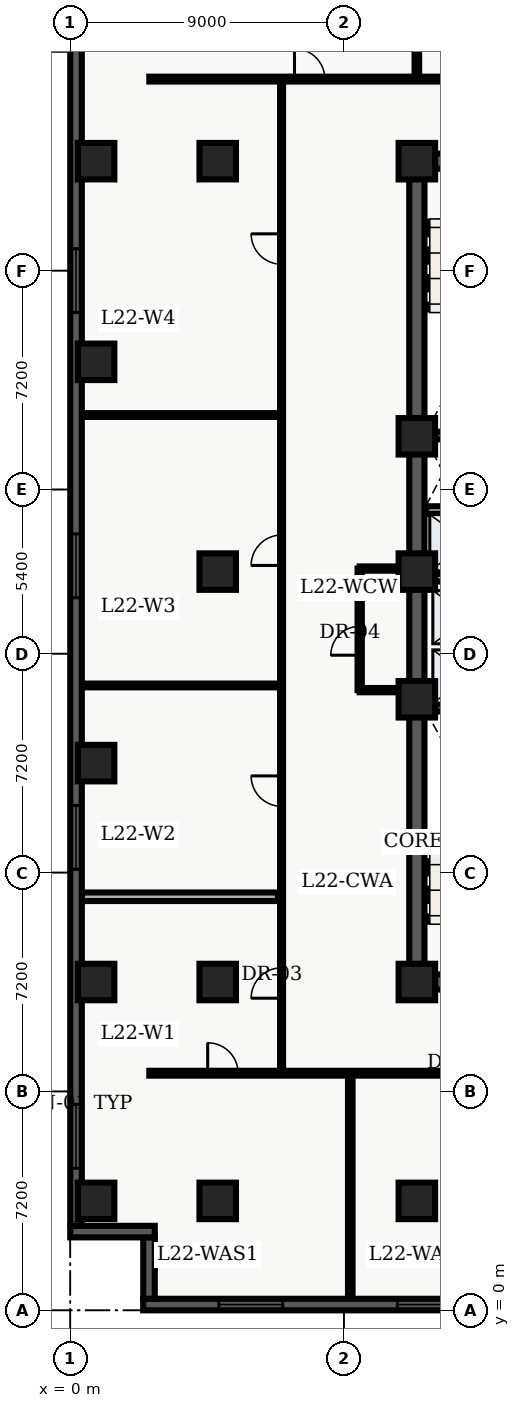
"""IFC4 building model, lengths in metres.
Left out: names, types, materials, properties, quantities, classifications, styles, units other than length and angle.
Written with IfcOpenShell. Run it as: python <this file> out.ifc"""

import sys

from ifc_helpers import new_model, entity, si_unit, converted_unit, direction, frame, origin_with_axes, origin_2d_with_axis, place, context, subcontext, project, spatial, polyline, rectangle, outline, extrude, element, fill, save


model = new_model("IFC4")
c1 = context("Model", 3, precision=1e-05, world=origin_with_axes(), true_north=direction((0.0, 1.0)))
c2 = subcontext(c1, "Body", "Model", "MODEL_VIEW")
j1 = project(units=[si_unit("LENGTHUNIT", "METRE"), converted_unit("PLANEANGLEUNIT", "DEGREE", entity("IfcPlaneAngleMeasure", 0.017), si_unit("PLANEANGLEUNIT", "RADIAN"), dimensions=[0, 0, 0, 0, 0, 0, 0])], contexts=[c1])
p1 = place(None, origin_with_axes())
s1 = spatial("IfcSite", under=j1, at=p1, CompositionType="ELEMENT")
p2 = place(p1, origin_with_axes())
s2 = spatial("IfcBuilding", under=s1, at=p2, CompositionType="ELEMENT")
p3 = place(p2, frame((0.0, 0.0, 93.0), z_axis=(0.0, 0.0, 1.0), x_axis=(1.0, 0.0, 0.0)))
s3 = spatial("IfcBuildingStorey", under=s2, at=p3, CompositionType="ELEMENT", Elevation=93.0)
p4 = place(p3, frame((11.4, 10.8, 0.0), z_axis=(0.0, 0.0, 1.0), x_axis=(0.0, 1.0, 0.0)))
e1 = element("IfcWall", 1, at=p4, inside=s3, PredefinedType="SHEAR", context=c2, shape_type="SweptSolid", body=[
    extrude(outline(polyline([(0.0, -0.25), (27.0, -0.25), (27.0, 0.25), (0.0, 0.25), (0.0, -0.25)])), origin_with_axes(), (0.0, 0.0, 1.0), 3.66),
])
p5 = place(p3, frame((11.4, 10.8, 0.0), z_axis=(0.0, 0.0, 1.0), x_axis=(1.0, 0.0, 0.0)))
e2 = element("IfcWall", 2, at=p5, inside=s3, PredefinedType="SHEAR", context=c2, shape_type="SweptSolid", body=[
    extrude(outline(polyline([(0.0, -0.25), (7.2, -0.25), (7.2, 0.25), (0.0, 0.25), (0.0, -0.25)])), origin_with_axes(), (0.0, 0.0, 1.0), 3.66),
])
p6 = place(p5, frame((2.625, 0.0, 0.0), z_axis=(0.0, 0.0, 1.0), x_axis=(1.0, 0.0, 0.0)))
e3 = element("IfcOpeningElement", 3, at=p6, cuts=e2, PredefinedType="OPENING", context=c2, shape_type="SweptSolid", body=[
    extrude(rectangle(XDim=1.05, YDim=0.52, at=origin_2d_with_axis()), origin_with_axes(), (0.0, 0.0, 1.0), 2.15),
])
p7 = place(p3, frame((11.4, 37.8, 0.0), z_axis=(0.0, 0.0, 1.0), x_axis=(1.0, 0.0, 0.0)))
e4 = element("IfcWall", 4, at=p7, inside=s3, PredefinedType="SHEAR", context=c2, shape_type="SweptSolid", body=[
    extrude(outline(polyline([(0.0, -0.25), (7.2, -0.25), (7.2, 0.25), (0.0, 0.25), (0.0, -0.25)])), origin_with_axes(), (0.0, 0.0, 1.0), 3.66),
])
p8 = place(p7, frame((2.625, 0.0, 0.0), z_axis=(0.0, 0.0, 1.0), x_axis=(1.0, 0.0, 0.0)))
e5 = element("IfcOpeningElement", 5, at=p8, cuts=e4, PredefinedType="OPENING", context=c2, shape_type="SweptSolid", body=[
    extrude(rectangle(XDim=1.05, YDim=0.52, at=origin_2d_with_axis()), origin_with_axes(), (0.0, 0.0, 1.0), 2.15),
])
for number, where, z_axis, x_axis in (
    (6, (11.65, 19.825, 0.0), (0.0, 0.0, 1.0), (1.0, 0.0, 0.0)),
    (7, (11.65, 28.775, 0.0), (0.0, 0.0, 1.0), (1.0, 0.0, 0.0)),
):
    element("IfcWall", number, at=place(p3, frame(where, z_axis=z_axis, x_axis=x_axis)), inside=s3, PredefinedType="SHEAR", context=c2, shape_type="SweptSolid", body=[
        extrude(outline(polyline([(0.0, -0.125), (6.7, -0.125), (6.7, 0.125), (0.0, 0.125), (0.0, -0.125)])), origin_with_axes(), (0.0, 0.0, 1.0), 3.66),
    ])
p9 = place(p3, frame((11.7, 24.1, 0.0), z_axis=(0.0, 0.0, 1.0), x_axis=(1.0, 0.0, 0.0)))
e8 = element("IfcWall", 8, at=p9, inside=s3, PredefinedType="SOLIDWALL", context=c2, shape_type="SweptSolid", body=[
    extrude(outline(polyline([(0.0, -0.125), (6.6, -0.125), (6.6, 0.125), (0.0, 0.125), (0.0, -0.125)])), origin_with_axes(), (0.0, 0.0, 1.0), 2.7),
])
p10 = place(p9, frame((3.75, 0.0, 0.0), z_axis=(0.0, 0.0, 1.0), x_axis=(1.0, 0.0, 0.0)))
e9 = element("IfcOpeningElement", 9, at=p10, cuts=e8, PredefinedType="OPENING", context=c2, shape_type="SweptSolid", body=[
    extrude(rectangle(XDim=0.9, YDim=0.27, at=origin_2d_with_axis()), origin_with_axes(), (0.0, 0.0, 1.0), 2.15),
])
p11 = place(p3, frame((11.7, 26.325, 0.0), z_axis=(0.0, 0.0, 1.0), x_axis=(1.0, 0.0, 0.0)))
e10 = element("IfcWall", 10, at=p11, inside=s3, PredefinedType="SOLIDWALL", context=c2, shape_type="SweptSolid", body=[
    extrude(outline(polyline([(0.0, -0.125), (6.6, -0.125), (6.6, 0.125), (0.0, 0.125), (0.0, -0.125)])), origin_with_axes(), (0.0, 0.0, 1.0), 2.7),
])
p12 = place(p11, frame((3.5, 0.0, 0.0), z_axis=(0.0, 0.0, 1.0), x_axis=(1.0, 0.0, 0.0)))
e11 = element("IfcOpeningElement", 11, at=p12, cuts=e10, PredefinedType="OPENING", context=c2, shape_type="SweptSolid", body=[
    extrude(rectangle(XDim=0.9, YDim=0.27, at=origin_2d_with_axis()), origin_with_axes(), (0.0, 0.0, 1.0), 2.15),
])
for number, where, z_axis, x_axis in (
    (12, (11.4, 3.6, 0.0), (0.0, 0.0, 1.0), (1.0, 0.0, 0.0)),
    (13, (11.4, 10.8, 0.0), (0.0, 0.0, 1.0), (1.0, 0.0, 0.0)),
    (14, (11.4, 20.1, 0.0), (0.0, 0.0, 1.0), (1.0, 0.0, 0.0)),
    (15, (11.4, 24.3, 0.0), (0.0, 0.0, 1.0), (1.0, 0.0, 0.0)),
    (16, (11.4, 28.75, 0.0), (0.0, 0.0, 1.0), (1.0, 0.0, 0.0)),
    (17, (11.4, 37.8, 0.0), (0.0, 0.0, 1.0), (1.0, 0.0, 0.0)),
    (18, (4.85, 3.6, 0.0), (0.0, 0.0, 1.0), (1.0, 0.0, 0.0)),
    (19, (4.85, 10.8, 0.0), (0.0, 0.0, 1.0), (1.0, 0.0, 0.0)),
    (20, (4.85, 24.3, 0.0), (0.0, 0.0, 1.0), (1.0, 0.0, 0.0)),
    (21, (4.85, 37.8, 0.0), (0.0, 0.0, 1.0), (1.0, 0.0, 0.0)),
    (22, (0.85, 3.6, 0.0), (0.0, 0.0, 1.0), (1.0, 0.0, 0.0)),
    (23, (0.85, 10.8, 0.0), (0.0, 0.0, 1.0), (1.0, 0.0, 0.0)),
    (24, (0.85, 18.0, 0.0), (0.0, 0.0, 1.0), (1.0, 0.0, 0.0)),
    (25, (0.85, 31.2, 0.0), (0.0, 0.0, 1.0), (1.0, 0.0, 0.0)),
    (26, (0.85, 37.8, 0.0), (0.0, 0.0, 1.0), (1.0, 0.0, 0.0)),
):
    element("IfcColumn", number, at=place(p3, frame(where, z_axis=z_axis, x_axis=x_axis)), inside=s3, PredefinedType="COLUMN", context=c2, shape_type="SweptSolid", body=[
        extrude(rectangle(XDim=1.2, YDim=1.2, at=origin_2d_with_axis()), origin_with_axes(), (0.0, 0.0, 1.0), 3.9),
    ])
p13 = place(p3, frame((9.52, 20.4, 0.0), z_axis=(0.0, 0.0, 1.0), x_axis=(0.0, 1.0, 0.0)))
e27 = element("IfcWall", 27, at=p13, inside=s3, PredefinedType="PARTITIONING", context=c2, shape_type="SweptSolid", body=[
    extrude(outline(polyline([(0.0, -0.07), (4.0, -0.07), (4.0, 0.07), (0.0, 0.07), (0.0, -0.07)])), origin_with_axes(), (0.0, 0.0, 1.0), 2.7),
])
p14 = place(p13, frame((1.625, 0.0, 0.0), z_axis=(0.0, 0.0, 1.0), x_axis=(1.0, 0.0, 0.0)))
e28 = element("IfcOpeningElement", 28, at=p14, cuts=e27, PredefinedType="OPENING", context=c2, shape_type="SweptSolid", body=[
    extrude(rectangle(XDim=0.95, YDim=0.16, at=origin_2d_with_axis()), origin_with_axes(), (0.0, 0.0, 1.0), 2.15),
])
for number, where, z_axis, x_axis in (
    (29, (9.52, 20.4, 0.0), (0.0, 0.0, 1.0), (1.0, 0.0, 0.0)),
    (30, (9.52, 24.4, 0.0), (0.0, 0.0, 1.0), (1.0, 0.0, 0.0)),
):
    element("IfcWall", number, at=place(p3, frame(where, z_axis=z_axis, x_axis=x_axis)), inside=s3, PredefinedType="PARTITIONING", context=c2, shape_type="SweptSolid", body=[
        extrude(outline(polyline([(0.0, -0.07), (1.58, -0.07), (1.58, 0.07), (0.0, 0.07), (0.0, -0.07)])), origin_with_axes(), (0.0, 0.0, 1.0), 2.7),
    ])
p15 = place(p3, frame((2.6, 7.8, 0.0), z_axis=(0.0, 0.0, 1.0), x_axis=(1.0, 0.0, 0.0)))
e31 = element("IfcWall", 31, at=p15, inside=s3, PredefinedType="PARTITIONING", context=c2, shape_type="SweptSolid", body=[
    extrude(outline(polyline([(0.0, -0.08), (18.625, -0.08), (18.625, 0.08), (0.0, 0.08), (0.0, -0.08)])), origin_with_axes(), (0.0, 0.0, 1.0), 2.7),
])
p16 = place(p15, frame((2.42, 0.0, 0.0), z_axis=(0.0, 0.0, 1.0), x_axis=(1.0, 0.0, 0.0)))
e32 = element("IfcOpeningElement", 32, at=p16, cuts=e31, PredefinedType="OPENING", context=c2, shape_type="SweptSolid", body=[
    extrude(rectangle(XDim=1.0, YDim=0.18, at=origin_2d_with_axis()), origin_with_axes(), (0.0, 0.0, 1.0), 2.15),
])
p17 = place(p15, frame((10.523, 0.0, 0.0), z_axis=(0.0, 0.0, 1.0), x_axis=(1.0, 0.0, 0.0)))
e33 = element("IfcOpeningElement", 33, at=p17, cuts=e31, PredefinedType="OPENING", context=c2, shape_type="SweptSolid", body=[
    extrude(rectangle(XDim=1.2, YDim=0.18, at=origin_2d_with_axis()), origin_with_axes(), (0.0, 0.0, 1.0), 2.2),
])
p18 = place(p15, frame((16.468, 0.0, 0.0), z_axis=(0.0, 0.0, 1.0), x_axis=(1.0, 0.0, 0.0)))
e34 = element("IfcOpeningElement", 34, at=p18, cuts=e31, PredefinedType="OPENING", context=c2, shape_type="SweptSolid", body=[
    extrude(rectangle(XDim=1.0, YDim=0.18, at=origin_2d_with_axis()), origin_with_axes(), (0.0, 0.0, 1.0), 2.15),
])
p19 = place(p3, frame((2.6, 40.5, 0.0), z_axis=(0.0, 0.0, 1.0), x_axis=(1.0, 0.0, 0.0)))
e35 = element("IfcWall", 35, at=p19, inside=s3, PredefinedType="PARTITIONING", context=c2, shape_type="SweptSolid", body=[
    extrude(outline(polyline([(0.0, -0.08), (18.65, -0.08), (18.65, 0.08), (0.0, 0.08), (0.0, -0.08)])), origin_with_axes(), (0.0, 0.0, 1.0), 2.7),
])
p20 = place(p19, frame((5.275, 0.0, 0.0), z_axis=(0.0, 0.0, 1.0), x_axis=(1.0, 0.0, 0.0)))
e36 = element("IfcOpeningElement", 36, at=p20, cuts=e35, PredefinedType="OPENING", context=c2, shape_type="SweptSolid", body=[
    extrude(rectangle(XDim=1.0, YDim=0.18, at=origin_2d_with_axis()), origin_with_axes(), (0.0, 0.0, 1.0), 2.15),
])
p21 = place(p19, frame((12.61, 0.0, 0.0), z_axis=(0.0, 0.0, 1.0), x_axis=(1.0, 0.0, 0.0)))
e37 = element("IfcOpeningElement", 37, at=p21, cuts=e35, PredefinedType="OPENING", context=c2, shape_type="SweptSolid", body=[
    extrude(rectangle(XDim=1.2, YDim=0.18, at=origin_2d_with_axis()), origin_with_axes(), (0.0, 0.0, 1.0), 2.2),
])
p22 = place(p3, frame((6.95, 7.8, 0.0), z_axis=(0.0, 0.0, 1.0), x_axis=(0.0, 1.0, 0.0)))
e38 = element("IfcWall", 38, at=p22, inside=s3, PredefinedType="PARTITIONING", context=c2, shape_type="SweptSolid", body=[
    extrude(outline(polyline([(0.0, -0.05), (32.7, -0.05), (32.7, 0.05), (0.0, 0.05), (0.0, -0.05)])), origin_with_axes(), (0.0, 0.0, 1.0), 2.7),
])
p23 = place(p22, frame((2.967, 0.0, 0.0), z_axis=(0.0, 0.0, 1.0), x_axis=(1.0, 0.0, 0.0)))
e39 = element("IfcOpeningElement", 39, at=p23, cuts=e38, PredefinedType="OPENING", context=c2, shape_type="SweptSolid", body=[
    extrude(rectangle(XDim=1.0, YDim=0.12, at=origin_2d_with_axis()), origin_with_axes(), (0.0, 0.0, 1.0), 2.15),
])
p24 = place(p22, frame((9.279, 0.0, 0.0), z_axis=(0.0, 0.0, 1.0), x_axis=(1.0, 0.0, 0.0)))
e40 = element("IfcOpeningElement", 40, at=p24, cuts=e38, PredefinedType="OPENING", context=c2, shape_type="SweptSolid", body=[
    extrude(rectangle(XDim=1.0, YDim=0.12, at=origin_2d_with_axis()), origin_with_axes(), (0.0, 0.0, 1.0), 2.15),
])
p25 = place(p22, frame((17.202, 0.0, 0.0), z_axis=(0.0, 0.0, 1.0), x_axis=(1.0, 0.0, 0.0)))
e41 = element("IfcOpeningElement", 41, at=p25, cuts=e38, PredefinedType="OPENING", context=c2, shape_type="SweptSolid", body=[
    extrude(rectangle(XDim=1.0, YDim=0.12, at=origin_2d_with_axis()), origin_with_axes(), (0.0, 0.0, 1.0), 2.15),
])
p26 = place(p22, frame((27.11, 0.0, 0.0), z_axis=(0.0, 0.0, 1.0), x_axis=(1.0, 0.0, 0.0)))
e42 = element("IfcOpeningElement", 42, at=p26, cuts=e38, PredefinedType="OPENING", context=c2, shape_type="SweptSolid", body=[
    extrude(rectangle(XDim=1.0, YDim=0.12, at=origin_2d_with_axis()), origin_with_axes(), (0.0, 0.0, 1.0), 2.15),
])
p27 = place(p3, frame((0.375, 13.604, 0.0), z_axis=(0.0, 0.0, 1.0), x_axis=(1.0, 0.0, 0.0)))
e43 = element("IfcWall", 43, at=p27, inside=s3, PredefinedType="PARTITIONING", context=c2, shape_type="SweptSolid", body=[
    extrude(outline(polyline([(0.0, -0.14), (6.455, -0.14), (6.455, 0.14), (0.0, 0.14), (0.0, -0.14)])), origin_with_axes(), (0.0, 0.0, 1.0), 2.7),
])
for number, where, z_axis, x_axis in (
    (44, (0.375, 20.554, 0.0), (0.0, 0.0, 1.0), (1.0, 0.0, 0.0)),
    (45, (0.375, 29.45, 0.0), (0.0, 0.0, 1.0), (1.0, 0.0, 0.0)),
):
    element("IfcWall", number, at=place(p3, frame(where, z_axis=z_axis, x_axis=x_axis)), inside=s3, PredefinedType="PARTITIONING", context=c2, shape_type="SweptSolid", body=[
        extrude(outline(polyline([(0.0, -0.062), (6.455, -0.062), (6.455, 0.062), (0.0, 0.062), (0.0, -0.062)])), origin_with_axes(), (0.0, 0.0, 1.0), 2.7),
    ])
p28 = place(p3, frame((9.21, 0.36, 0.0), z_axis=(0.0, 0.0, 1.0), x_axis=(0.0, 1.0, 0.0)))
e46 = element("IfcWall", 46, at=p28, inside=s3, PredefinedType="PARTITIONING", context=c2, shape_type="SweptSolid", body=[
    extrude(outline(polyline([(0.0, -0.075), (7.34, -0.075), (7.34, 0.075), (0.0, 0.075), (0.0, -0.075)])), origin_with_axes(), (0.0, 0.0, 1.0), 2.7),
])
p29 = place(p3, frame((11.4, 40.6, 0.0), z_axis=(0.0, 0.0, 1.0), x_axis=(0.0, 1.0, 0.0)))
e47 = element("IfcWall", 47, at=p29, inside=s3, PredefinedType="PARTITIONING", context=c2, shape_type="SweptSolid", body=[
    extrude(outline(polyline([(0.0, -0.075), (7.64, -0.075), (7.64, 0.075), (0.0, 0.075), (0.0, -0.075)])), origin_with_axes(), (0.0, 0.0, 1.0), 2.7),
])
p30 = place(p3, frame((0.19, 2.78, 0.0), z_axis=(0.0, 0.0, 1.0), x_axis=(0.0, 1.0, 0.0)))
e48 = element("IfcWall", 48, at=p30, inside=s3, PredefinedType="SOLIDWALL", context=c2, shape_type="SweptSolid", body=[
    extrude(outline(polyline([(0.0, -0.19), (43.42, -0.19), (43.42, 0.19), (0.0, 0.19), (0.0, -0.19)])), origin_with_axes(), (0.0, 0.0, 1.0), 3.66),
])
p31 = place(p30, frame((2.946, 0.0, 0.45), z_axis=(0.0, 0.0, 1.0), x_axis=(1.0, 0.0, 0.0)))
e49 = element("IfcOpeningElement", 49, at=p31, cuts=e48, PredefinedType="OPENING", context=c2, shape_type="SweptSolid", body=[
    extrude(rectangle(XDim=2.1, YDim=0.4, at=origin_2d_with_axis()), origin_with_axes(), (0.0, 0.0, 1.0), 2.2),
])
p32 = place(p30, frame((12.778, 0.0, 0.45), z_axis=(0.0, 0.0, 1.0), x_axis=(1.0, 0.0, 0.0)))
e50 = element("IfcOpeningElement", 50, at=p32, cuts=e48, PredefinedType="OPENING", context=c2, shape_type="SweptSolid", body=[
    extrude(rectangle(XDim=2.1, YDim=0.4, at=origin_2d_with_axis()), origin_with_axes(), (0.0, 0.0, 1.0), 2.2),
])
p33 = place(p30, frame((21.71, 0.0, 0.45), z_axis=(0.0, 0.0, 1.0), x_axis=(1.0, 0.0, 0.0)))
e51 = element("IfcOpeningElement", 51, at=p33, cuts=e48, PredefinedType="OPENING", context=c2, shape_type="SweptSolid", body=[
    extrude(rectangle(XDim=2.1, YDim=0.4, at=origin_2d_with_axis()), origin_with_axes(), (0.0, 0.0, 1.0), 2.2),
])
p34 = place(p30, frame((31.092, 0.0, 0.45), z_axis=(0.0, 0.0, 1.0), x_axis=(1.0, 0.0, 0.0)))
e52 = element("IfcOpeningElement", 52, at=p34, cuts=e48, PredefinedType="OPENING", context=c2, shape_type="SweptSolid", body=[
    extrude(rectangle(XDim=2.1, YDim=0.4, at=origin_2d_with_axis()), origin_with_axes(), (0.0, 0.0, 1.0), 2.2),
])
p35 = place(p30, frame((40.024, 0.0, 0.45), z_axis=(0.0, 0.0, 1.0), x_axis=(1.0, 0.0, 0.0)))
e53 = element("IfcOpeningElement", 53, at=p35, cuts=e48, PredefinedType="OPENING", context=c2, shape_type="SweptSolid", body=[
    extrude(rectangle(XDim=2.1, YDim=0.4, at=origin_2d_with_axis()), origin_with_axes(), (0.0, 0.0, 1.0), 2.2),
])
p36 = place(p3, frame((21.22, 0.19, 0.0), z_axis=(0.0, 0.0, 1.0), x_axis=(-1.0, 0.0, 0.0)))
e54 = element("IfcWall", 54, at=p36, inside=s3, PredefinedType="SOLIDWALL", context=c2, shape_type="SweptSolid", body=[
    extrude(outline(polyline([(0.0, -0.19), (18.82, -0.19), (18.82, 0.19), (0.0, 0.19), (0.0, -0.19)])), origin_with_axes(), (0.0, 0.0, 1.0), 3.66),
])
p37 = place(p36, frame((9.41, 0.0, 0.45), z_axis=(0.0, 0.0, 1.0), x_axis=(1.0, 0.0, 0.0)))
e55 = element("IfcOpeningElement", 55, at=p37, cuts=e54, PredefinedType="OPENING", context=c2, shape_type="SweptSolid", body=[
    extrude(rectangle(XDim=2.1, YDim=0.4, at=origin_2d_with_axis()), origin_with_axes(), (0.0, 0.0, 1.0), 2.2),
])
p38 = place(p36, frame((15.283, 0.0, 0.45), z_axis=(0.0, 0.0, 1.0), x_axis=(1.0, 0.0, 0.0)))
e56 = element("IfcOpeningElement", 56, at=p38, cuts=e54, PredefinedType="OPENING", context=c2, shape_type="SweptSolid", body=[
    extrude(rectangle(XDim=2.1, YDim=0.4, at=origin_2d_with_axis()), origin_with_axes(), (0.0, 0.0, 1.0), 2.2),
])
p39 = place(p3, frame((2.59, 0.38, 0.0), z_axis=(0.0, 0.0, 1.0), x_axis=(0.0, 1.0, 0.0)))
e57 = element("IfcWall", 57, at=p39, inside=s3, PredefinedType="SOLIDWALL", context=c2, shape_type="SweptSolid", body=[
    extrude(outline(polyline([(0.0, -0.19), (2.02, -0.19), (2.02, 0.19), (0.0, 0.19), (0.0, -0.19)])), origin_with_axes(), (0.0, 0.0, 1.0), 3.66),
])
p40 = place(p3, frame((2.78, 2.59, 0.0), z_axis=(0.0, 0.0, 1.0), x_axis=(-1.0, 0.0, 0.0)))
e58 = element("IfcWall", 58, at=p40, inside=s3, PredefinedType="SOLIDWALL", context=c2, shape_type="SweptSolid", body=[
    extrude(outline(polyline([(0.0, -0.19), (2.78, -0.19), (2.78, 0.19), (0.0, 0.19), (0.0, -0.19)])), origin_with_axes(), (0.0, 0.0, 1.0), 3.66),
])
p41 = place(p13, frame((1.625, 0.0, 0.0), z_axis=(0.0, 0.0, 1.0), x_axis=(1.0, 0.0, 0.0)))
e59 = element("IfcDoor", 59, at=p41, inside=s3, OperationType="SINGLE_SWING_LEFT", PredefinedType="DOOR", context=c2, shape_type="SweptSolid", body=[
    extrude(rectangle(XDim=0.95, YDim=0.084, at=origin_2d_with_axis()), origin_with_axes(), (0.0, 0.0, 1.0), 2.15),
])
fill(e28, e59)
p42 = place(p22, frame((2.967, 0.0, 0.0), z_axis=(0.0, 0.0, 1.0), x_axis=(1.0, 0.0, 0.0)))
e60 = element("IfcDoor", 60, at=p42, inside=s3, OperationType="SINGLE_SWING_LEFT", PredefinedType="DOOR", context=c2, shape_type="SweptSolid", body=[
    extrude(rectangle(XDim=1.0, YDim=0.06, at=origin_2d_with_axis()), origin_with_axes(), (0.0, 0.0, 1.0), 2.15),
])
fill(e39, e60)
p43 = place(p22, frame((9.279, 0.0, 0.0), z_axis=(0.0, 0.0, 1.0), x_axis=(1.0, 0.0, 0.0)))
e61 = element("IfcDoor", 61, at=p43, inside=s3, OperationType="SINGLE_SWING_RIGHT", PredefinedType="DOOR", context=c2, shape_type="SweptSolid", body=[
    extrude(rectangle(XDim=1.0, YDim=0.06, at=origin_2d_with_axis()), origin_with_axes(), (0.0, 0.0, 1.0), 2.15),
])
fill(e40, e61)
p44 = place(p22, frame((17.202, 0.0, 0.0), z_axis=(0.0, 0.0, 1.0), x_axis=(1.0, 0.0, 0.0)))
e62 = element("IfcDoor", 62, at=p44, inside=s3, OperationType="SINGLE_SWING_LEFT", PredefinedType="DOOR", context=c2, shape_type="SweptSolid", body=[
    extrude(rectangle(XDim=1.0, YDim=0.06, at=origin_2d_with_axis()), origin_with_axes(), (0.0, 0.0, 1.0), 2.15),
])
fill(e41, e62)
p45 = place(p22, frame((27.11, 0.0, 0.0), z_axis=(0.0, 0.0, 1.0), x_axis=(1.0, 0.0, 0.0)))
e63 = element("IfcDoor", 63, at=p45, inside=s3, OperationType="SINGLE_SWING_RIGHT", PredefinedType="DOOR", context=c2, shape_type="SweptSolid", body=[
    extrude(rectangle(XDim=1.0, YDim=0.06, at=origin_2d_with_axis()), origin_with_axes(), (0.0, 0.0, 1.0), 2.15),
])
fill(e42, e63)
p46 = place(p15, frame((2.42, 0.0, 0.0), z_axis=(0.0, 0.0, 1.0), x_axis=(1.0, 0.0, 0.0)))
e64 = element("IfcDoor", 64, at=p46, inside=s3, OperationType="SINGLE_SWING_LEFT", PredefinedType="DOOR", context=c2, shape_type="SweptSolid", body=[
    extrude(rectangle(XDim=1.0, YDim=0.09, at=origin_2d_with_axis()), origin_with_axes(), (0.0, 0.0, 1.0), 2.15),
])
fill(e32, e64)
p47 = place(p19, frame((5.275, 0.0, 0.0), z_axis=(0.0, 0.0, 1.0), x_axis=(1.0, 0.0, 0.0)))
e65 = element("IfcDoor", 65, at=p47, inside=s3, OperationType="SINGLE_SWING_LEFT", PredefinedType="DOOR", context=c2, shape_type="SweptSolid", body=[
    extrude(rectangle(XDim=1.0, YDim=0.09, at=origin_2d_with_axis()), origin_with_axes(), (0.0, 0.0, 1.0), 2.15),
])
fill(e36, e65)
p48 = place(p30, frame((2.946, 0.0, 0.45), z_axis=(0.0, 0.0, 1.0), x_axis=(1.0, 0.0, 0.0)))
e66 = element("IfcWindow", 66, at=p48, inside=s3, PredefinedType="WINDOW", context=c2, shape_type="SweptSolid", body=[
    extrude(rectangle(XDim=2.1, YDim=0.09, at=origin_2d_with_axis()), origin_with_axes(), (0.0, 0.0, 1.0), 2.2),
])
fill(e49, e66)
p49 = place(p30, frame((12.778, 0.0, 0.45), z_axis=(0.0, 0.0, 1.0), x_axis=(1.0, 0.0, 0.0)))
e67 = element("IfcWindow", 67, at=p49, inside=s3, PredefinedType="WINDOW", context=c2, shape_type="SweptSolid", body=[
    extrude(rectangle(XDim=2.1, YDim=0.09, at=origin_2d_with_axis()), origin_with_axes(), (0.0, 0.0, 1.0), 2.2),
])
fill(e50, e67)
p50 = place(p30, frame((21.71, 0.0, 0.45), z_axis=(0.0, 0.0, 1.0), x_axis=(1.0, 0.0, 0.0)))
e68 = element("IfcWindow", 68, at=p50, inside=s3, PredefinedType="WINDOW", context=c2, shape_type="SweptSolid", body=[
    extrude(rectangle(XDim=2.1, YDim=0.09, at=origin_2d_with_axis()), origin_with_axes(), (0.0, 0.0, 1.0), 2.2),
])
fill(e51, e68)
p51 = place(p30, frame((31.092, 0.0, 0.45), z_axis=(0.0, 0.0, 1.0), x_axis=(1.0, 0.0, 0.0)))
e69 = element("IfcWindow", 69, at=p51, inside=s3, PredefinedType="WINDOW", context=c2, shape_type="SweptSolid", body=[
    extrude(rectangle(XDim=2.1, YDim=0.09, at=origin_2d_with_axis()), origin_with_axes(), (0.0, 0.0, 1.0), 2.2),
])
fill(e52, e69)
p52 = place(p36, frame((9.41, 0.0, 0.45), z_axis=(0.0, 0.0, 1.0), x_axis=(1.0, 0.0, 0.0)))
e70 = element("IfcWindow", 70, at=p52, inside=s3, PredefinedType="WINDOW", context=c2, shape_type="SweptSolid", body=[
    extrude(rectangle(XDim=2.1, YDim=0.09, at=origin_2d_with_axis()), origin_with_axes(), (0.0, 0.0, 1.0), 2.2),
])
fill(e55, e70)
p53 = place(p36, frame((15.283, 0.0, 0.45), z_axis=(0.0, 0.0, 1.0), x_axis=(1.0, 0.0, 0.0)))
e71 = element("IfcWindow", 71, at=p53, inside=s3, PredefinedType="WINDOW", context=c2, shape_type="SweptSolid", body=[
    extrude(rectangle(XDim=2.1, YDim=0.09, at=origin_2d_with_axis()), origin_with_axes(), (0.0, 0.0, 1.0), 2.2),
])
fill(e56, e71)
save(model, sys.argv[1])
